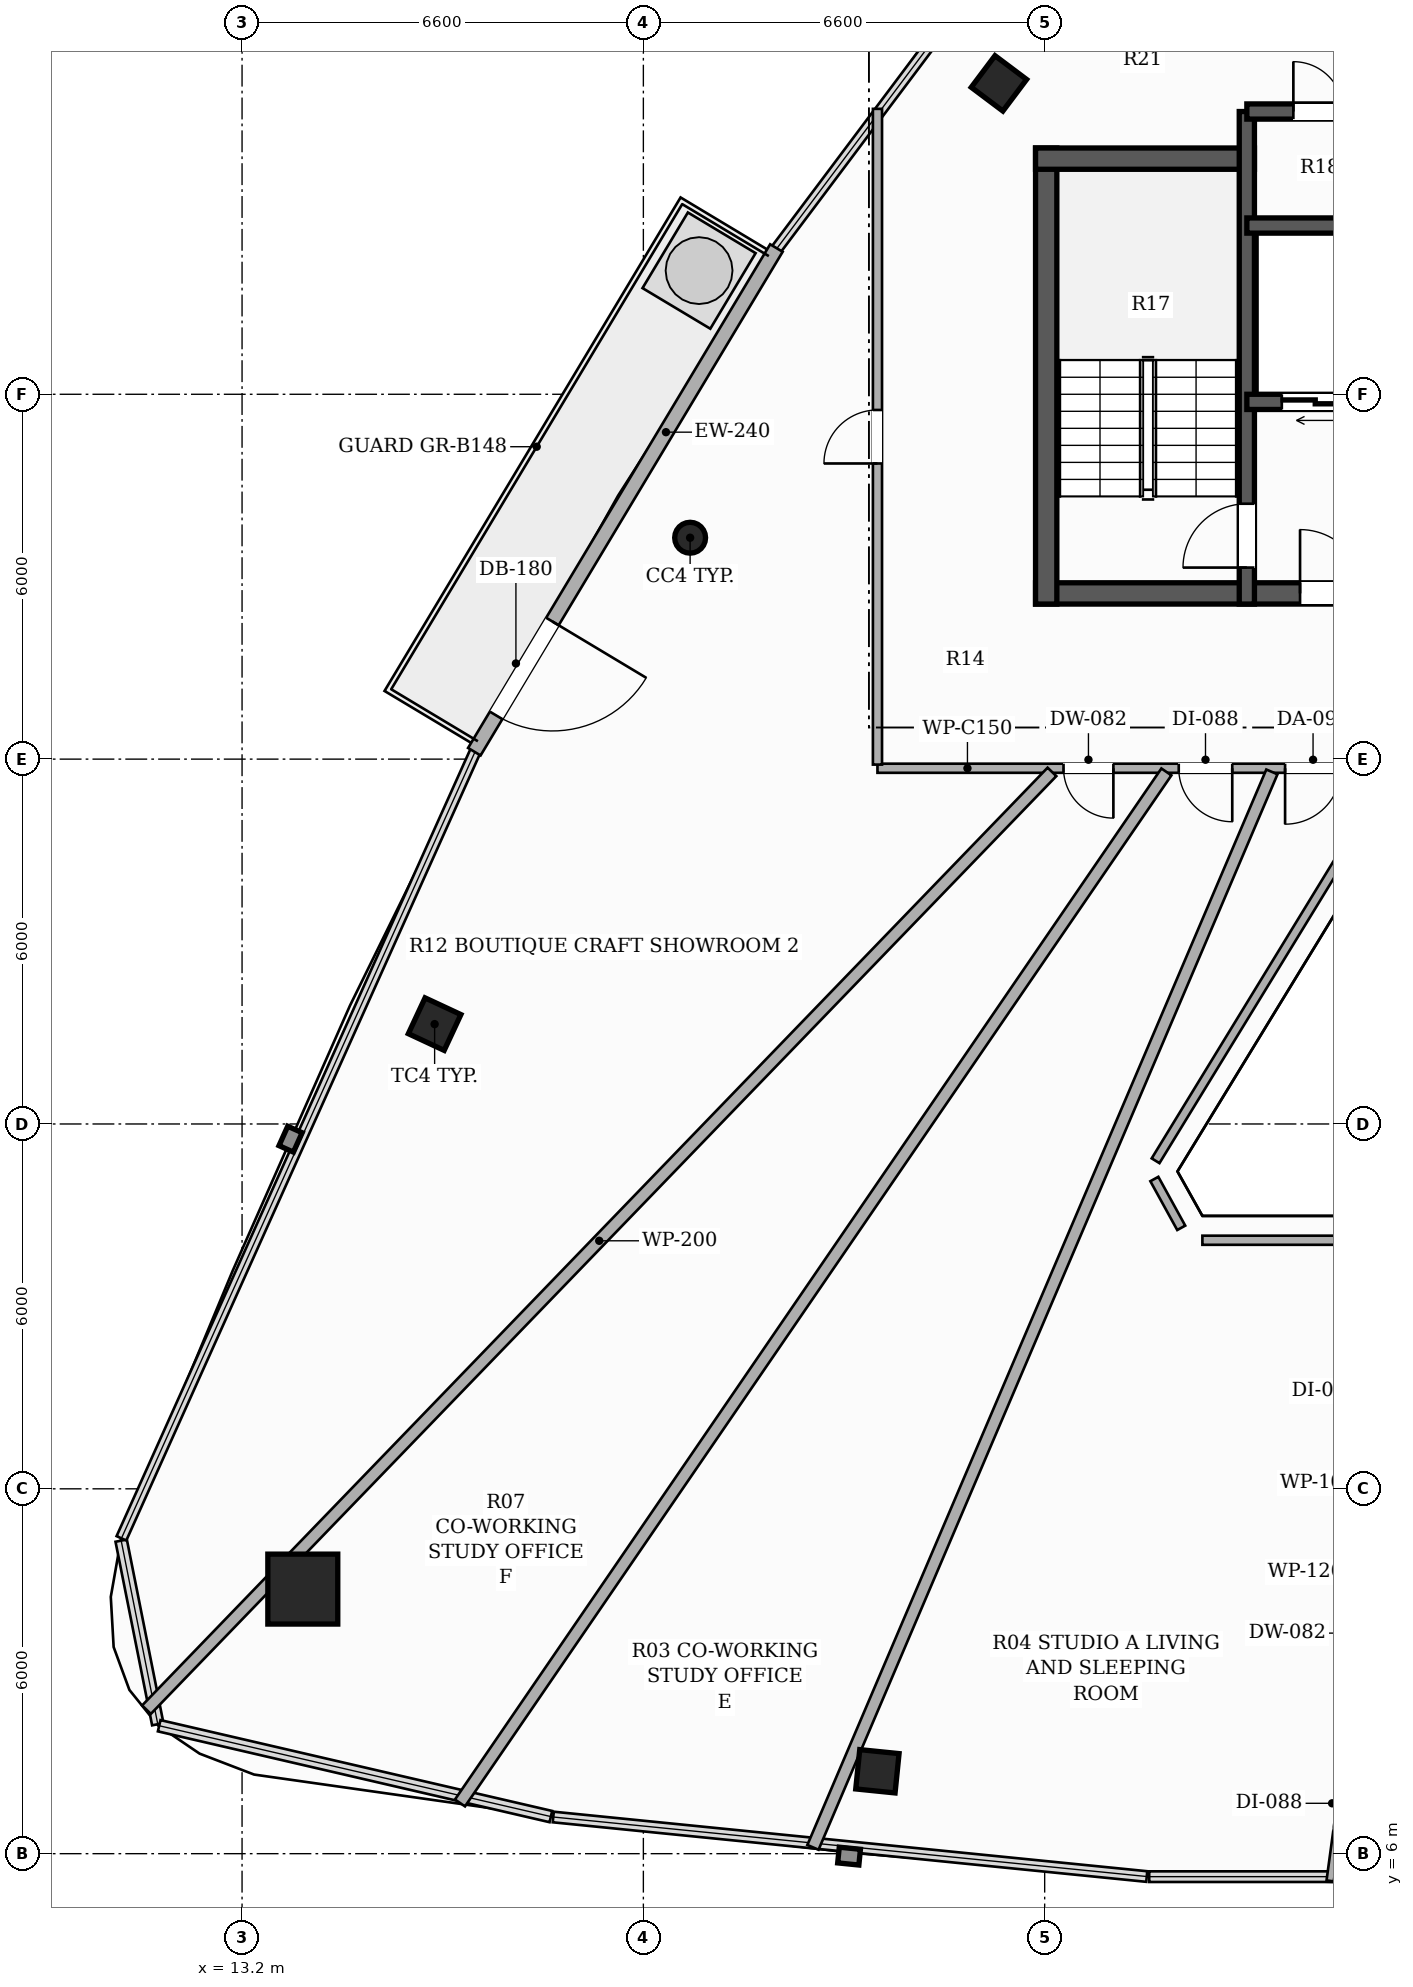
"""IFC4 building model, lengths in metres.
Left out: names, types, materials, properties, quantities, classifications, styles, units other than length and angle.
Written with IfcOpenShell. Run it as: python <this file> out.ifc"""

import sys

from ifc_helpers import new_model, si_unit, direction, frame, frame_2d, origin, origin_2d, place, context, subcontext, project, spatial, rectangle, hollow_rectangle, hollow_circle, extrude, element, fill, save


model = new_model("IFC4")
c1 = context("Model", 3, precision=1e-05, world=origin(), true_north=direction((0.0, 1.0)))
c2 = subcontext(c1, "Body", "Model", "MODEL_VIEW")
j1 = project(units=[si_unit("LENGTHUNIT", "METRE"), si_unit("PLANEANGLEUNIT", "RADIAN")], contexts=[c1])
p1 = place(None, origin())
s1 = spatial("IfcSite", under=j1, at=p1, CompositionType="ELEMENT")
p2 = place(p1, origin())
s2 = spatial("IfcBuilding", under=s1, at=p2, CompositionType="ELEMENT")
p3 = place(p2, frame((0.0, 0.0, 266.75)))
s3 = spatial("IfcBuildingStorey", under=s2, at=p3, CompositionType="ELEMENT", Elevation=266.75)
p4 = place(p3, frame((26.25, 26.725, 0.0), z_axis=(0.0, 0.0, 1.0), x_axis=(1.0, 0.0, 0.0)))
e1 = element("IfcWall", 1, at=p4, inside=s3, PredefinedType="SHEAR", context=c2, shape_type="SweptSolid", body=[
    extrude(rectangle(XDim=13.5, YDim=0.35, at=frame_2d((6.75, 0.0))), origin(), (0.0, 0.0, 1.0), 3.3),
])
p5 = place(p4, frame((4.35, 0.0, 0.0)))
e2 = element("IfcOpeningElement", 2, at=p5, cuts=e1, PredefinedType="OPENING", context=c2, shape_type="SweptSolid", body=[
    extrude(rectangle(XDim=1.05, YDim=2.15, at=frame_2d((0.525, 1.075))), frame((0.0, 0.185, 0.0), z_axis=(0.0, -1.0, 0.0), x_axis=(1.0, 0.0, 0.0)), (0.0, 0.0, 1.0), 0.37),
])
p6 = place(p4, frame((8.3, 0.0, 0.0)))
e3 = element("IfcOpeningElement", 3, at=p6, cuts=e1, PredefinedType="OPENING", context=c2, shape_type="SweptSolid", body=[
    extrude(rectangle(XDim=1.05, YDim=2.15, at=frame_2d((0.525, 1.075))), frame((0.0, 0.185, 0.0), z_axis=(0.0, -1.0, 0.0), x_axis=(1.0, 0.0, 0.0)), (0.0, 0.0, 1.0), 0.37),
])
p7 = place(p3, frame((26.425, 26.55, 0.0), z_axis=(0.0, 0.0, 1.0), x_axis=(0.0, 1.0, 0.0)))
e4 = element("IfcWall", 4, at=p7, inside=s3, PredefinedType="SHEAR", context=c2, shape_type="SweptSolid", body=[
    extrude(rectangle(XDim=7.5, YDim=0.35, at=frame_2d((3.75, 0.0))), origin(), (0.0, 0.0, 1.0), 3.3),
])
p8 = place(p3, frame((26.25, 33.875, 0.0), z_axis=(0.0, 0.0, 1.0), x_axis=(1.0, 0.0, 0.0)))
e5 = element("IfcWall", 5, at=p8, inside=s3, PredefinedType="SHEAR", context=c2, shape_type="SweptSolid", body=[
    extrude(rectangle(XDim=3.6, YDim=0.35, at=frame_2d((1.8, 0.0))), origin(), (0.0, 0.0, 1.0), 3.3),
])
p9 = place(p3, frame((29.725, 26.55, 0.0), z_axis=(0.0, 0.0, 1.0), x_axis=(0.0, 1.0, 0.0)))
e6 = element("IfcWall", 6, at=p9, inside=s3, PredefinedType="SHEAR", context=c2, shape_type="SweptSolid", body=[
    extrude(rectangle(XDim=8.1, YDim=0.25, at=frame_2d((4.05, 0.0))), origin(), (0.0, 0.0, 1.0), 3.3),
])
p10 = place(p9, frame((0.6, 0.0, 0.0)))
e7 = element("IfcOpeningElement", 7, at=p10, cuts=e6, PredefinedType="OPENING", context=c2, shape_type="SweptSolid", body=[
    extrude(rectangle(XDim=1.05, YDim=2.15, at=frame_2d((0.525, 1.075))), frame((0.0, 0.135, 0.0), z_axis=(0.0, -1.0, 0.0), x_axis=(1.0, 0.0, 0.0)), (0.0, 0.0, 1.0), 0.27),
])
p11 = place(p3, frame((36.275, 29.875, 0.0), z_axis=(0.0, 0.0, 1.0), x_axis=(-1.0, 0.0, 0.0)))
e8 = element("IfcWall", 8, at=p11, inside=s3, PredefinedType="SHEAR", context=c2, shape_type="SweptSolid", body=[
    extrude(rectangle(XDim=6.55, YDim=0.25, at=frame_2d((3.275, 0.0))), origin(), (0.0, 0.0, 1.0), 3.3),
])
p12 = place(p11, frame((4.875, 0.0, 0.0)))
e9 = element("IfcOpeningElement", 9, at=p12, cuts=e8, PredefinedType="OPENING", context=c2, shape_type="SweptSolid", body=[
    extrude(rectangle(XDim=1.1, YDim=2.2, at=frame_2d((0.55, 1.1))), frame((0.0, 0.135, 0.0), z_axis=(0.0, -1.0, 0.0), x_axis=(1.0, 0.0, 0.0)), (0.0, 0.0, 1.0), 0.27),
])
p13 = place(p11, frame((2.875, 0.0, 0.0)))
e10 = element("IfcOpeningElement", 10, at=p13, cuts=e8, PredefinedType="OPENING", context=c2, shape_type="SweptSolid", body=[
    extrude(rectangle(XDim=1.1, YDim=2.2, at=frame_2d((0.55, 1.1))), frame((0.0, 0.135, 0.0), z_axis=(0.0, -1.0, 0.0), x_axis=(1.0, 0.0, 0.0)), (0.0, 0.0, 1.0), 0.27),
])
p14 = place(p11, frame((0.6, 0.0, 0.0)))
e11 = element("IfcOpeningElement", 11, at=p14, cuts=e8, PredefinedType="OPENING", context=c2, shape_type="SweptSolid", body=[
    extrude(rectangle(XDim=1.3, YDim=2.2, at=frame_2d((0.65, 1.1))), frame((0.0, 0.135, 0.0), z_axis=(0.0, -1.0, 0.0), x_axis=(1.0, 0.0, 0.0)), (0.0, 0.0, 1.0), 0.27),
])
p15 = place(p3, frame((29.725, 32.775, 0.0), z_axis=(0.0, 0.0, 1.0), x_axis=(1.0, 0.0, 0.0)))
e12 = element("IfcWall", 12, at=p15, inside=s3, PredefinedType="SHEAR", context=c2, shape_type="SweptSolid", body=[
    extrude(rectangle(XDim=6.55, YDim=0.25, at=frame_2d((3.275, 0.0))), origin(), (0.0, 0.0, 1.0), 3.3),
])
p16 = place(p3, frame((29.725, 34.65, 0.0), z_axis=(0.0, 0.0, 1.0), x_axis=(1.0, 0.0, 0.0)))
e13 = element("IfcWall", 13, at=p16, inside=s3, PredefinedType="SHEAR", context=c2, shape_type="SweptSolid", body=[
    extrude(rectangle(XDim=6.55, YDim=0.25, at=frame_2d((3.275, 0.0))), origin(), (0.0, 0.0, 1.0), 3.3),
])
p17 = place(p16, frame((0.765, 0.0, 0.0)))
e14 = element("IfcOpeningElement", 14, at=p17, cuts=e13, PredefinedType="OPENING", context=c2, shape_type="SweptSolid", body=[
    extrude(rectangle(XDim=0.82, YDim=2.1, at=frame_2d((0.41, 1.05))), frame((0.0, 0.135, 0.0), z_axis=(0.0, -1.0, 0.0), x_axis=(1.0, 0.0, 0.0)), (0.0, 0.0, 1.0), 0.27),
])
p18 = place(p16, frame((2.84, 0.0, 0.0)))
e15 = element("IfcOpeningElement", 15, at=p18, cuts=e13, PredefinedType="OPENING", context=c2, shape_type="SweptSolid", body=[
    extrude(rectangle(XDim=0.82, YDim=2.1, at=frame_2d((0.41, 1.05))), frame((0.0, 0.135, 0.0), z_axis=(0.0, -1.0, 0.0), x_axis=(1.0, 0.0, 0.0)), (0.0, 0.0, 1.0), 0.27),
])
p19 = place(p16, frame((4.915, 0.0, 0.0)))
e16 = element("IfcOpeningElement", 16, at=p19, cuts=e13, PredefinedType="OPENING", context=c2, shape_type="SweptSolid", body=[
    extrude(rectangle(XDim=0.82, YDim=2.1, at=frame_2d((0.41, 1.05))), frame((0.0, 0.135, 0.0), z_axis=(0.0, -1.0, 0.0), x_axis=(1.0, 0.0, 0.0)), (0.0, 0.0, 1.0), 0.27),
])
p20 = place(p3, frame((14.199, 10.351, 0.0), z_axis=(0.0, 0.0, 1.0), x_axis=(1.0, 0.0, 0.0)))
e17 = element("IfcColumn", 17, at=p20, inside=s3, PredefinedType="COLUMN", context=c2, shape_type="SweptSolid", body=[
    extrude(hollow_rectangle(XDim=1.15, YDim=1.15, WallThickness=0.036, at=origin_2d()), origin(), (0.0, 0.0, 1.0), 3.3),
])
p21 = place(p3, frame((25.648, 35.113, 0.0), z_axis=(0.0, 0.0, 1.0), x_axis=(0.600420225326, 0.799684658487, 0.0)))
e18 = element("IfcColumn", 18, at=p21, inside=s3, PredefinedType="COLUMN", context=c2, shape_type="SweptSolid", body=[
    extrude(hollow_rectangle(XDim=0.65, YDim=0.65, WallThickness=0.022, at=origin_2d()), origin(), (0.0, 0.0, 1.0), 3.3),
])
p22 = place(p3, frame((20.569, 27.641, 0.0), z_axis=(0.0, 0.0, 1.0), x_axis=(1.0, 0.0, 0.0)))
e19 = element("IfcColumn", 19, at=p22, inside=s3, PredefinedType="COLUMN", context=c2, shape_type="SweptSolid", body=[
    extrude(hollow_circle(Radius=0.254, WallThickness=0.016, at=origin_2d()), origin(), (0.0, 0.0, 1.0), 3.3),
])
for number, where, z_axis, x_axis in (
    (20, (16.367, 19.642, 0.0), (0.0, 0.0, 1.0), (0.423, 0.906, 0.0)),
    (21, (23.649, 7.355, 0.0), (0.0, 0.0, 1.0), (-0.995, 0.101, 0.0)),
):
    element("IfcColumn", number, at=place(p3, frame(where, z_axis=z_axis, x_axis=x_axis)), inside=s3, PredefinedType="COLUMN", context=c2, shape_type="SweptSolid", body=[
        extrude(hollow_rectangle(XDim=0.65, YDim=0.65, WallThickness=0.022, at=origin_2d()), origin(), (0.0, 0.0, 1.0), 3.3),
    ])
p23 = place(p3, frame((21.988, 32.405, 0.0), z_axis=(0.0, 0.0, 1.0), x_axis=(-0.514361929684, -0.857573206958, 0.0)))
e22 = element("IfcWall", 22, at=p23, inside=s3, PredefinedType="SOLIDWALL", context=c2, shape_type="SweptSolid", body=[
    extrude(rectangle(XDim=9.659, YDim=0.24, at=frame_2d((4.829, 0.0))), origin(), (0.0, 0.0, 1.0), 2.624),
])
p24 = place(p23, frame((7.162, 0.0, 0.0)))
e23 = element("IfcOpeningElement", 23, at=p24, cuts=e22, PredefinedType="OPENING", context=c2, shape_type="SweptSolid", body=[
    extrude(rectangle(XDim=1.8, YDim=2.2, at=frame_2d((0.9, 1.1))), frame((0.0, 0.13, 0.0), z_axis=(0.0, -1.0, 0.0), x_axis=(1.0, 0.0, 0.0)), (0.0, 0.0, 1.0), 0.26),
])
p25 = place(p3, frame((32.168, 23.85, 0.0), z_axis=(0.0, 0.0, 1.0), x_axis=(-1.0, 0.0, 0.0)))
e24 = element("IfcWall", 24, at=p25, inside=s3, PredefinedType="PARTITIONING", context=c2, shape_type="SweptSolid", body=[
    extrude(rectangle(XDim=8.518, YDim=0.15, at=frame_2d((4.259, 0.0))), origin(), (0.0, 0.0, 1.0), 2.565),
])
p26 = place(p25, frame((0.894, 0.0, 0.0)))
e25 = element("IfcOpeningElement", 25, at=p26, cuts=e24, PredefinedType="OPENING", context=c2, shape_type="SweptSolid", body=[
    extrude(rectangle(XDim=0.92, YDim=2.15, at=frame_2d((0.46, 1.075))), frame((0.0, 0.085, 0.0), z_axis=(0.0, -1.0, 0.0), x_axis=(1.0, 0.0, 0.0)), (0.0, 0.0, 1.0), 0.17),
])
p27 = place(p25, frame((2.683, 0.0, 0.0)))
e26 = element("IfcOpeningElement", 26, at=p27, cuts=e24, PredefinedType="OPENING", context=c2, shape_type="SweptSolid", body=[
    extrude(rectangle(XDim=0.88, YDim=2.1, at=frame_2d((0.44, 1.05))), frame((0.0, 0.085, 0.0), z_axis=(0.0, -1.0, 0.0), x_axis=(1.0, 0.0, 0.0)), (0.0, 0.0, 1.0), 0.17),
])
p28 = place(p25, frame((4.638, 0.0, 0.0)))
e27 = element("IfcOpeningElement", 27, at=p28, cuts=e24, PredefinedType="OPENING", context=c2, shape_type="SweptSolid", body=[
    extrude(rectangle(XDim=0.82, YDim=2.1, at=frame_2d((0.41, 1.05))), frame((0.0, 0.085, 0.0), z_axis=(0.0, -1.0, 0.0), x_axis=(1.0, 0.0, 0.0)), (0.0, 0.0, 1.0), 0.17),
])
p29 = place(p3, frame((23.65, 23.91, 0.0), z_axis=(0.0, 0.0, 1.0), x_axis=(0.0, 1.0, 0.0)))
e28 = element("IfcWall", 28, at=p29, inside=s3, PredefinedType="PARTITIONING", context=c2, shape_type="SweptSolid", body=[
    extrude(rectangle(XDim=10.784, YDim=0.15, at=frame_2d((5.392, 0.0))), origin(), (0.0, 0.0, 1.0), 2.492),
])
p30 = place(p29, frame((4.952, 0.0, 0.0)))
e29 = element("IfcOpeningElement", 29, at=p30, cuts=e28, PredefinedType="OPENING", context=c2, shape_type="SweptSolid", body=[
    extrude(rectangle(XDim=0.88, YDim=2.1, at=frame_2d((0.44, 1.05))), frame((0.0, 0.085, 0.0), z_axis=(0.0, -1.0, 0.0), x_axis=(1.0, 0.0, 0.0)), (0.0, 0.0, 1.0), 0.17),
])
p31 = place(p3, frame((37.006, 16.088, 0.0), z_axis=(0.0, 0.0, 1.0), x_axis=(-1.0, 0.0, 0.0)))
e30 = element("IfcWall", 30, at=p31, inside=s3, PredefinedType="PARTITIONING", context=c2, shape_type="SweptSolid", body=[
    extrude(rectangle(XDim=8.012, YDim=0.15, at=frame_2d((4.006, 0.0))), origin(), (0.0, 0.0, 1.0), 2.773),
])
p32 = place(p3, frame((28.646, 16.292, 0.0), z_axis=(0.0, 0.0, 1.0), x_axis=(-0.482133469033, 0.876097778811, 0.0)))
e31 = element("IfcWall", 31, at=p32, inside=s3, PredefinedType="PARTITIONING", context=c2, shape_type="SweptSolid", body=[
    extrude(rectangle(XDim=0.917, YDim=0.15, at=frame_2d((0.458, 0.0))), origin(), (0.0, 0.0, 1.0), 3.06),
])
p33 = place(p3, frame((28.224, 17.395, 0.0), z_axis=(0.0, 0.0, 1.0), x_axis=(0.521913594497, 0.852998358661, 0.0)))
e32 = element("IfcWall", 32, at=p33, inside=s3, PredefinedType="PARTITIONING", context=c2, shape_type="SweptSolid", body=[
    extrude(rectangle(XDim=7.497, YDim=0.15, at=frame_2d((3.749, 0.0))), origin(), (0.0, 0.0, 1.0), 2.773),
])
p34 = place(p3, frame((26.52, 23.79, 0.0), z_axis=(0.0, 0.0, 1.0), x_axis=(-0.694637190704, -0.719360252788, 0.0)))
e33 = element("IfcWall", 33, at=p34, inside=s3, PredefinedType="PARTITIONING", context=c2, shape_type="SweptSolid", body=[
    extrude(rectangle(XDim=21.439, YDim=0.2, at=frame_2d((10.719, 0.0))), origin(), (0.0, 0.0, 1.0), 2.492),
])
p35 = place(p3, frame((22.589, 6.104, 0.0), z_axis=(0.0, 0.0, 1.0), x_axis=(0.392518309842, 0.919744190761, 0.0)))
e34 = element("IfcWall", 34, at=p35, inside=s3, PredefinedType="PARTITIONING", context=c2, shape_type="SweptSolid", body=[
    extrude(rectangle(XDim=19.229, YDim=0.2, at=frame_2d((9.615, 0.0))), origin(), (0.0, 0.0, 1.0), 2.492),
])
p36 = place(p3, frame((16.784, 6.834, 0.0), z_axis=(0.0, 0.0, 1.0), x_axis=(0.565235631435, 0.824929500598, 0.0)))
e35 = element("IfcWall", 35, at=p36, inside=s3, PredefinedType="PARTITIONING", context=c2, shape_type="SweptSolid", body=[
    extrude(rectangle(XDim=20.554, YDim=0.2, at=frame_2d((10.277, 0.0))), origin(), (0.0, 0.0, 1.0), 2.492),
])
p37 = place(p3, frame((31.437, 8.067, 0.0), z_axis=(0.0, 0.0, 1.0), x_axis=(-0.134765499074, -0.990877520312, 0.0)))
e36 = element("IfcWall", 36, at=p37, inside=s3, PredefinedType="PARTITIONING", context=c2, shape_type="SweptSolid", body=[
    extrude(rectangle(XDim=2.538, YDim=0.12, at=frame_2d((1.269, 0.0))), origin(), (0.0, 0.0, 1.0), 2.492),
])
p38 = place(p37, frame((0.829, 0.0, 0.0)))
e37 = element("IfcOpeningElement", 37, at=p38, cuts=e36, PredefinedType="OPENING", context=c2, shape_type="SweptSolid", body=[
    extrude(rectangle(XDim=0.88, YDim=2.1, at=frame_2d((0.44, 1.05))), frame((0.0, 0.07, 0.0), z_axis=(0.0, -1.0, 0.0), x_axis=(1.0, 0.0, 0.0)), (0.0, 0.0, 1.0), 0.14),
])
p39 = place(p24, origin())
e38 = element("IfcDoor", 38, at=p39, inside=s3, OperationType="SINGLE_SWING_LEFT", PredefinedType="DOOR", context=c2, shape_type="SweptSolid", body=[
    extrude(rectangle(XDim=1.8, YDim=2.2, at=frame_2d((0.9, 1.1))), frame((0.0, 0.025, 0.0), z_axis=(0.0, -1.0, 0.0), x_axis=(1.0, 0.0, 0.0)), (0.0, 0.0, 1.0), 0.05),
])
fill(e23, e38)
p40 = place(p10, origin())
e39 = element("IfcDoor", 39, at=p40, inside=s3, OperationType="SINGLE_SWING_LEFT", PredefinedType="DOOR", context=c2, shape_type="SweptSolid", body=[
    extrude(rectangle(XDim=1.05, YDim=2.15, at=frame_2d((0.525, 1.075))), frame((0.0, 0.025, 0.0), z_axis=(0.0, -1.0, 0.0), x_axis=(1.0, 0.0, 0.0)), (0.0, 0.0, 1.0), 0.05),
])
fill(e7, e39)
p41 = place(p5, origin())
e40 = element("IfcDoor", 40, at=p41, inside=s3, OperationType="SINGLE_SWING_LEFT", PredefinedType="DOOR", context=c2, shape_type="SweptSolid", body=[
    extrude(rectangle(XDim=1.05, YDim=2.15, at=frame_2d((0.525, 1.075))), frame((0.0, 0.025, 0.0), z_axis=(0.0, -1.0, 0.0), x_axis=(1.0, 0.0, 0.0)), (0.0, 0.0, 1.0), 0.05),
])
fill(e2, e40)
p42 = place(p12, origin())
e41 = element("IfcDoor", 41, at=p42, inside=s3, OperationType="DOUBLE_DOOR_SLIDING", PredefinedType="DOOR", context=c2, shape_type="SweptSolid", body=[
    extrude(rectangle(XDim=1.1, YDim=2.2, at=frame_2d((0.55, 1.1))), frame((0.0, 0.025, 0.0), z_axis=(0.0, -1.0, 0.0), x_axis=(1.0, 0.0, 0.0)), (0.0, 0.0, 1.0), 0.05),
])
fill(e9, e41)
p43 = place(p17, origin())
e42 = element("IfcDoor", 42, at=p43, inside=s3, OperationType="SINGLE_SWING_LEFT", PredefinedType="DOOR", context=c2, shape_type="SweptSolid", body=[
    extrude(rectangle(XDim=0.82, YDim=2.1, at=frame_2d((0.41, 1.05))), frame((0.0, 0.025, 0.0), z_axis=(0.0, -1.0, 0.0), x_axis=(1.0, 0.0, 0.0)), (0.0, 0.0, 1.0), 0.05),
])
fill(e14, e42)
p44 = place(p30, origin())
e43 = element("IfcDoor", 43, at=p44, inside=s3, OperationType="SINGLE_SWING_LEFT", PredefinedType="DOOR", context=c2, shape_type="SweptSolid", body=[
    extrude(rectangle(XDim=0.88, YDim=2.1, at=frame_2d((0.44, 1.05))), frame((0.0, 0.025, 0.0), z_axis=(0.0, -1.0, 0.0), x_axis=(1.0, 0.0, 0.0)), (0.0, 0.0, 1.0), 0.05),
])
fill(e29, e43)
p45 = place(p26, origin())
e44 = element("IfcDoor", 44, at=p45, inside=s3, OperationType="SINGLE_SWING_RIGHT", PredefinedType="DOOR", context=c2, shape_type="SweptSolid", body=[
    extrude(rectangle(XDim=0.92, YDim=2.15, at=frame_2d((0.46, 1.075))), frame((0.0, 0.025, 0.0), z_axis=(0.0, -1.0, 0.0), x_axis=(1.0, 0.0, 0.0)), (0.0, 0.0, 1.0), 0.05),
])
fill(e25, e44)
p46 = place(p27, origin())
e45 = element("IfcDoor", 45, at=p46, inside=s3, OperationType="SINGLE_SWING_LEFT", PredefinedType="DOOR", context=c2, shape_type="SweptSolid", body=[
    extrude(rectangle(XDim=0.88, YDim=2.1, at=frame_2d((0.44, 1.05))), frame((0.0, 0.025, 0.0), z_axis=(0.0, -1.0, 0.0), x_axis=(1.0, 0.0, 0.0)), (0.0, 0.0, 1.0), 0.05),
])
fill(e26, e45)
p47 = place(p28, origin())
e46 = element("IfcDoor", 46, at=p47, inside=s3, OperationType="SINGLE_SWING_LEFT", PredefinedType="DOOR", context=c2, shape_type="SweptSolid", body=[
    extrude(rectangle(XDim=0.82, YDim=2.1, at=frame_2d((0.41, 1.05))), frame((0.0, 0.025, 0.0), z_axis=(0.0, -1.0, 0.0), x_axis=(1.0, 0.0, 0.0)), (0.0, 0.0, 1.0), 0.05),
])
fill(e27, e46)
save(model, sys.argv[1])
